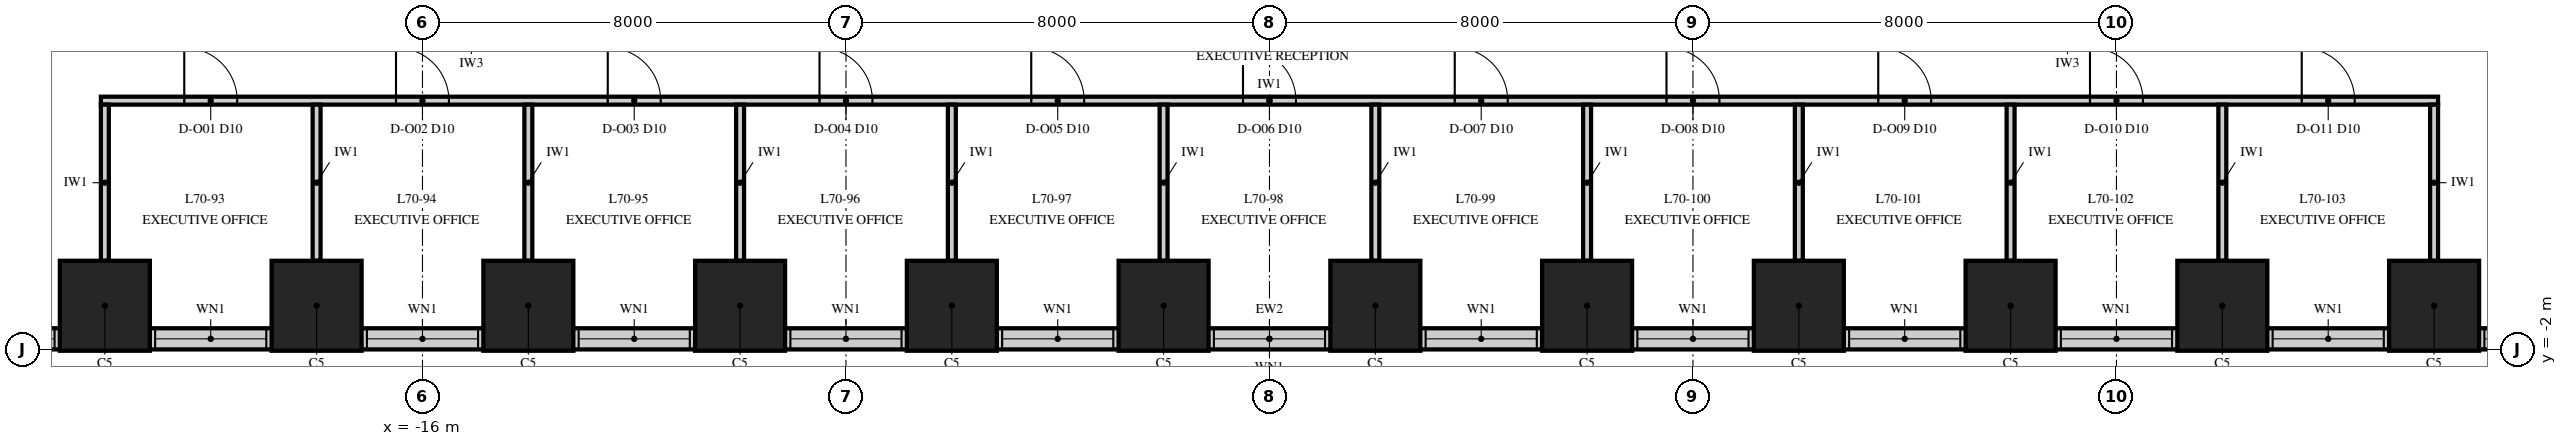
"""IFC4 building model, lengths in metres.
Left out: names, types, materials, properties, quantities, classifications, styles, units other than length and angle.
Written with IfcOpenShell. Run it as: python <this file> out.ifc"""

import sys

from ifc_helpers import new_model, si_unit, direction, frame, frame_2d, origin, origin_2d, place, context, subcontext, project, spatial, rectangle, extrude, element, fill, save


model = new_model("IFC4")
c1 = context("Model", 3, precision=1e-05, world=origin(), true_north=direction((0.0, 1.0)))
c2 = subcontext(c1, "Body", "Model", "MODEL_VIEW")
j1 = project(units=[si_unit("LENGTHUNIT", "METRE"), si_unit("PLANEANGLEUNIT", "RADIAN")], contexts=[c1])
p1 = place(None, origin())
s1 = spatial("IfcSite", under=j1, at=p1, CompositionType="ELEMENT")
p2 = place(p1, origin())
s2 = spatial("IfcBuilding", under=s1, at=p2, CompositionType="ELEMENT")
p3 = place(p2, frame((0.0, 0.0, 300.0)))
s3 = spatial("IfcBuildingStorey", under=s2, at=p3, CompositionType="ELEMENT", Elevation=300.0)
for number, where, z_axis, x_axis in (
    (1, (-22.0, -1.175, 0.0), (0.0, 0.0, 1.0), (1.0, 0.0, 0.0)),
    (2, (-18.0, -1.175, 0.0), (0.0, 0.0, 1.0), (1.0, 0.0, 0.0)),
    (3, (-14.0, -1.175, 0.0), (0.0, 0.0, 1.0), (1.0, 0.0, 0.0)),
    (4, (-10.0, -1.175, 0.0), (0.0, 0.0, 1.0), (1.0, 0.0, 0.0)),
    (5, (-6.0, -1.175, 0.0), (0.0, 0.0, 1.0), (1.0, 0.0, 0.0)),
    (6, (-2.0, -1.175, 0.0), (0.0, 0.0, 1.0), (1.0, 0.0, 0.0)),
    (7, (2.0, -1.175, 0.0), (0.0, 0.0, 1.0), (1.0, 0.0, 0.0)),
    (8, (6.0, -1.175, 0.0), (0.0, 0.0, 1.0), (1.0, 0.0, 0.0)),
    (9, (10.0, -1.175, 0.0), (0.0, 0.0, 1.0), (1.0, 0.0, 0.0)),
    (10, (14.0, -1.175, 0.0), (0.0, 0.0, 1.0), (1.0, 0.0, 0.0)),
    (11, (18.0, -1.175, 0.0), (0.0, 0.0, 1.0), (1.0, 0.0, 0.0)),
    (12, (22.0, -1.175, 0.0), (0.0, 0.0, 1.0), (1.0, 0.0, 0.0)),
):
    element("IfcColumn", number, at=place(p3, frame(where, z_axis=z_axis, x_axis=x_axis)), inside=s3, PredefinedType="COLUMN", context=c2, shape_type="SweptSolid", body=[
        extrude(rectangle(XDim=1.7, YDim=1.7, at=origin_2d()), origin(), (0.0, 0.0, 1.0), 4.0),
    ])
p4 = place(p3, frame((-26.0, -1.8, 0.0), z_axis=(0.0, 0.0, 1.0), x_axis=(1.0, 0.0, 0.0)))
e13 = element("IfcWall", 13, at=p4, inside=s3, PredefinedType="SOLIDWALL", context=c2, shape_type="SweptSolid", body=[
    extrude(rectangle(XDim=52.0, YDim=0.4, at=frame_2d((26.0, 0.0))), origin(), (0.0, 0.0, 1.0), 2.0),
])
p5 = place(p4, frame((0.95, 0.0, 0.8)))
e14 = element("IfcOpeningElement", 14, at=p5, cuts=e13, PredefinedType="OPENING", context=c2, shape_type="SweptSolid", body=[
    extrude(rectangle(XDim=2.1, YDim=1.15, at=frame_2d((1.05, 0.575))), frame((0.0, 0.215, 0.0), z_axis=(0.0, -1.0, 0.0), x_axis=(1.0, 0.0, 0.0)), (0.0, 0.0, 1.0), 0.43),
])
p6 = place(p4, frame((4.95, 0.0, 0.8)))
e15 = element("IfcOpeningElement", 15, at=p6, cuts=e13, PredefinedType="OPENING", context=c2, shape_type="SweptSolid", body=[
    extrude(rectangle(XDim=2.1, YDim=1.15, at=frame_2d((1.05, 0.575))), frame((0.0, 0.215, 0.0), z_axis=(0.0, -1.0, 0.0), x_axis=(1.0, 0.0, 0.0)), (0.0, 0.0, 1.0), 0.43),
])
p7 = place(p4, frame((8.95, 0.0, 0.8)))
e16 = element("IfcOpeningElement", 16, at=p7, cuts=e13, PredefinedType="OPENING", context=c2, shape_type="SweptSolid", body=[
    extrude(rectangle(XDim=2.1, YDim=1.15, at=frame_2d((1.05, 0.575))), frame((0.0, 0.215, 0.0), z_axis=(0.0, -1.0, 0.0), x_axis=(1.0, 0.0, 0.0)), (0.0, 0.0, 1.0), 0.43),
])
p8 = place(p4, frame((12.95, 0.0, 0.8)))
e17 = element("IfcOpeningElement", 17, at=p8, cuts=e13, PredefinedType="OPENING", context=c2, shape_type="SweptSolid", body=[
    extrude(rectangle(XDim=2.1, YDim=1.15, at=frame_2d((1.05, 0.575))), frame((0.0, 0.215, 0.0), z_axis=(0.0, -1.0, 0.0), x_axis=(1.0, 0.0, 0.0)), (0.0, 0.0, 1.0), 0.43),
])
p9 = place(p4, frame((16.95, 0.0, 0.8)))
e18 = element("IfcOpeningElement", 18, at=p9, cuts=e13, PredefinedType="OPENING", context=c2, shape_type="SweptSolid", body=[
    extrude(rectangle(XDim=2.1, YDim=1.15, at=frame_2d((1.05, 0.575))), frame((0.0, 0.215, 0.0), z_axis=(0.0, -1.0, 0.0), x_axis=(1.0, 0.0, 0.0)), (0.0, 0.0, 1.0), 0.43),
])
p10 = place(p4, frame((20.95, 0.0, 0.8)))
e19 = element("IfcOpeningElement", 19, at=p10, cuts=e13, PredefinedType="OPENING", context=c2, shape_type="SweptSolid", body=[
    extrude(rectangle(XDim=2.1, YDim=1.15, at=frame_2d((1.05, 0.575))), frame((0.0, 0.215, 0.0), z_axis=(0.0, -1.0, 0.0), x_axis=(1.0, 0.0, 0.0)), (0.0, 0.0, 1.0), 0.43),
])
p11 = place(p4, frame((24.95, 0.0, 0.8)))
e20 = element("IfcOpeningElement", 20, at=p11, cuts=e13, PredefinedType="OPENING", context=c2, shape_type="SweptSolid", body=[
    extrude(rectangle(XDim=2.1, YDim=1.15, at=frame_2d((1.05, 0.575))), frame((0.0, 0.215, 0.0), z_axis=(0.0, -1.0, 0.0), x_axis=(1.0, 0.0, 0.0)), (0.0, 0.0, 1.0), 0.43),
])
p12 = place(p4, frame((28.95, 0.0, 0.8)))
e21 = element("IfcOpeningElement", 21, at=p12, cuts=e13, PredefinedType="OPENING", context=c2, shape_type="SweptSolid", body=[
    extrude(rectangle(XDim=2.1, YDim=1.15, at=frame_2d((1.05, 0.575))), frame((0.0, 0.215, 0.0), z_axis=(0.0, -1.0, 0.0), x_axis=(1.0, 0.0, 0.0)), (0.0, 0.0, 1.0), 0.43),
])
p13 = place(p4, frame((32.95, 0.0, 0.8)))
e22 = element("IfcOpeningElement", 22, at=p13, cuts=e13, PredefinedType="OPENING", context=c2, shape_type="SweptSolid", body=[
    extrude(rectangle(XDim=2.1, YDim=1.15, at=frame_2d((1.05, 0.575))), frame((0.0, 0.215, 0.0), z_axis=(0.0, -1.0, 0.0), x_axis=(1.0, 0.0, 0.0)), (0.0, 0.0, 1.0), 0.43),
])
p14 = place(p4, frame((36.95, 0.0, 0.8)))
e23 = element("IfcOpeningElement", 23, at=p14, cuts=e13, PredefinedType="OPENING", context=c2, shape_type="SweptSolid", body=[
    extrude(rectangle(XDim=2.1, YDim=1.15, at=frame_2d((1.05, 0.575))), frame((0.0, 0.215, 0.0), z_axis=(0.0, -1.0, 0.0), x_axis=(1.0, 0.0, 0.0)), (0.0, 0.0, 1.0), 0.43),
])
p15 = place(p4, frame((40.95, 0.0, 0.8)))
e24 = element("IfcOpeningElement", 24, at=p15, cuts=e13, PredefinedType="OPENING", context=c2, shape_type="SweptSolid", body=[
    extrude(rectangle(XDim=2.1, YDim=1.15, at=frame_2d((1.05, 0.575))), frame((0.0, 0.215, 0.0), z_axis=(0.0, -1.0, 0.0), x_axis=(1.0, 0.0, 0.0)), (0.0, 0.0, 1.0), 0.43),
])
p16 = place(p4, frame((44.95, 0.0, 0.8)))
e25 = element("IfcOpeningElement", 25, at=p16, cuts=e13, PredefinedType="OPENING", context=c2, shape_type="SweptSolid", body=[
    extrude(rectangle(XDim=2.1, YDim=1.15, at=frame_2d((1.05, 0.575))), frame((0.0, 0.215, 0.0), z_axis=(0.0, -1.0, 0.0), x_axis=(1.0, 0.0, 0.0)), (0.0, 0.0, 1.0), 0.43),
])
p17 = place(p4, frame((48.95, 0.0, 0.8)))
e26 = element("IfcOpeningElement", 26, at=p17, cuts=e13, PredefinedType="OPENING", context=c2, shape_type="SweptSolid", body=[
    extrude(rectangle(XDim=2.1, YDim=1.15, at=frame_2d((1.05, 0.575))), frame((0.0, 0.215, 0.0), z_axis=(0.0, -1.0, 0.0), x_axis=(1.0, 0.0, 0.0)), (0.0, 0.0, 1.0), 0.43),
])
p18 = place(p3, frame((-22.075, 2.7, 0.0), z_axis=(0.0, 0.0, 1.0), x_axis=(1.0, 0.0, 0.0)))
e27 = element("IfcWall", 27, at=p18, inside=s3, PredefinedType="PARTITIONING", context=c2, shape_type="SweptSolid", body=[
    extrude(rectangle(XDim=44.15, YDim=0.15, at=frame_2d((22.075, 0.0))), origin(), (0.0, 0.0, 1.0), 3.23),
])
p19 = place(p18, frame((1.575, 0.0, 0.0)))
e28 = element("IfcOpeningElement", 28, at=p19, cuts=e27, PredefinedType="OPENING", context=c2, shape_type="SweptSolid", body=[
    extrude(rectangle(XDim=1.0, YDim=2.3, at=frame_2d((0.5, 1.15))), frame((0.0, 0.09, 0.0), z_axis=(0.0, -1.0, 0.0), x_axis=(1.0, 0.0, 0.0)), (0.0, 0.0, 1.0), 0.18),
])
p20 = place(p18, frame((5.575, 0.0, 0.0)))
e29 = element("IfcOpeningElement", 29, at=p20, cuts=e27, PredefinedType="OPENING", context=c2, shape_type="SweptSolid", body=[
    extrude(rectangle(XDim=1.0, YDim=2.3, at=frame_2d((0.5, 1.15))), frame((0.0, 0.09, 0.0), z_axis=(0.0, -1.0, 0.0), x_axis=(1.0, 0.0, 0.0)), (0.0, 0.0, 1.0), 0.18),
])
p21 = place(p18, frame((9.575, 0.0, 0.0)))
e30 = element("IfcOpeningElement", 30, at=p21, cuts=e27, PredefinedType="OPENING", context=c2, shape_type="SweptSolid", body=[
    extrude(rectangle(XDim=1.0, YDim=2.3, at=frame_2d((0.5, 1.15))), frame((0.0, 0.09, 0.0), z_axis=(0.0, -1.0, 0.0), x_axis=(1.0, 0.0, 0.0)), (0.0, 0.0, 1.0), 0.18),
])
p22 = place(p18, frame((13.575, 0.0, 0.0)))
e31 = element("IfcOpeningElement", 31, at=p22, cuts=e27, PredefinedType="OPENING", context=c2, shape_type="SweptSolid", body=[
    extrude(rectangle(XDim=1.0, YDim=2.3, at=frame_2d((0.5, 1.15))), frame((0.0, 0.09, 0.0), z_axis=(0.0, -1.0, 0.0), x_axis=(1.0, 0.0, 0.0)), (0.0, 0.0, 1.0), 0.18),
])
p23 = place(p18, frame((17.575, 0.0, 0.0)))
e32 = element("IfcOpeningElement", 32, at=p23, cuts=e27, PredefinedType="OPENING", context=c2, shape_type="SweptSolid", body=[
    extrude(rectangle(XDim=1.0, YDim=2.3, at=frame_2d((0.5, 1.15))), frame((0.0, 0.09, 0.0), z_axis=(0.0, -1.0, 0.0), x_axis=(1.0, 0.0, 0.0)), (0.0, 0.0, 1.0), 0.18),
])
p24 = place(p18, frame((21.575, 0.0, 0.0)))
e33 = element("IfcOpeningElement", 33, at=p24, cuts=e27, PredefinedType="OPENING", context=c2, shape_type="SweptSolid", body=[
    extrude(rectangle(XDim=1.0, YDim=2.3, at=frame_2d((0.5, 1.15))), frame((0.0, 0.09, 0.0), z_axis=(0.0, -1.0, 0.0), x_axis=(1.0, 0.0, 0.0)), (0.0, 0.0, 1.0), 0.18),
])
p25 = place(p18, frame((25.575, 0.0, 0.0)))
e34 = element("IfcOpeningElement", 34, at=p25, cuts=e27, PredefinedType="OPENING", context=c2, shape_type="SweptSolid", body=[
    extrude(rectangle(XDim=1.0, YDim=2.3, at=frame_2d((0.5, 1.15))), frame((0.0, 0.09, 0.0), z_axis=(0.0, -1.0, 0.0), x_axis=(1.0, 0.0, 0.0)), (0.0, 0.0, 1.0), 0.18),
])
p26 = place(p18, frame((29.575, 0.0, 0.0)))
e35 = element("IfcOpeningElement", 35, at=p26, cuts=e27, PredefinedType="OPENING", context=c2, shape_type="SweptSolid", body=[
    extrude(rectangle(XDim=1.0, YDim=2.3, at=frame_2d((0.5, 1.15))), frame((0.0, 0.09, 0.0), z_axis=(0.0, -1.0, 0.0), x_axis=(1.0, 0.0, 0.0)), (0.0, 0.0, 1.0), 0.18),
])
p27 = place(p18, frame((33.575, 0.0, 0.0)))
e36 = element("IfcOpeningElement", 36, at=p27, cuts=e27, PredefinedType="OPENING", context=c2, shape_type="SweptSolid", body=[
    extrude(rectangle(XDim=1.0, YDim=2.3, at=frame_2d((0.5, 1.15))), frame((0.0, 0.09, 0.0), z_axis=(0.0, -1.0, 0.0), x_axis=(1.0, 0.0, 0.0)), (0.0, 0.0, 1.0), 0.18),
])
p28 = place(p18, frame((37.575, 0.0, 0.0)))
e37 = element("IfcOpeningElement", 37, at=p28, cuts=e27, PredefinedType="OPENING", context=c2, shape_type="SweptSolid", body=[
    extrude(rectangle(XDim=1.0, YDim=2.3, at=frame_2d((0.5, 1.15))), frame((0.0, 0.09, 0.0), z_axis=(0.0, -1.0, 0.0), x_axis=(1.0, 0.0, 0.0)), (0.0, 0.0, 1.0), 0.18),
])
p29 = place(p18, frame((41.575, 0.0, 0.0)))
e38 = element("IfcOpeningElement", 38, at=p29, cuts=e27, PredefinedType="OPENING", context=c2, shape_type="SweptSolid", body=[
    extrude(rectangle(XDim=1.0, YDim=2.3, at=frame_2d((0.5, 1.15))), frame((0.0, 0.09, 0.0), z_axis=(0.0, -1.0, 0.0), x_axis=(1.0, 0.0, 0.0)), (0.0, 0.0, 1.0), 0.18),
])
for number, where, z_axis, x_axis in (
    (39, (-22.0, -0.325, 0.0), (0.0, 0.0, 1.0), (0.0, 1.0, 0.0)),
    (40, (-18.0, -0.325, 0.0), (0.0, 0.0, 1.0), (0.0, 1.0, 0.0)),
    (41, (-14.0, -0.325, 0.0), (0.0, 0.0, 1.0), (0.0, 1.0, 0.0)),
    (42, (-10.0, -0.325, 0.0), (0.0, 0.0, 1.0), (0.0, 1.0, 0.0)),
    (43, (-6.0, -0.325, 0.0), (0.0, 0.0, 1.0), (0.0, 1.0, 0.0)),
    (44, (-2.0, -0.325, 0.0), (0.0, 0.0, 1.0), (0.0, 1.0, 0.0)),
    (45, (2.0, -0.325, 0.0), (0.0, 0.0, 1.0), (0.0, 1.0, 0.0)),
    (46, (6.0, -0.325, 0.0), (0.0, 0.0, 1.0), (0.0, 1.0, 0.0)),
    (47, (10.0, -0.325, 0.0), (0.0, 0.0, 1.0), (0.0, 1.0, 0.0)),
    (48, (14.0, -0.325, 0.0), (0.0, 0.0, 1.0), (0.0, 1.0, 0.0)),
    (49, (18.0, -0.325, 0.0), (0.0, 0.0, 1.0), (0.0, 1.0, 0.0)),
    (50, (22.0, -0.325, 0.0), (0.0, 0.0, 1.0), (0.0, 1.0, 0.0)),
):
    element("IfcWall", number, at=place(p3, frame(where, z_axis=z_axis, x_axis=x_axis)), inside=s3, PredefinedType="PARTITIONING", context=c2, shape_type="SweptSolid", body=[
        extrude(rectangle(XDim=2.95, YDim=0.15, at=frame_2d((1.475, 0.0))), origin(), (0.0, 0.0, 1.0), 3.23),
    ])
p30 = place(p5, origin())
e51 = element("IfcWindow", 51, at=p30, inside=s3, PartitioningType="SINGLE_PANEL", PredefinedType="WINDOW", context=c2, shape_type="SweptSolid", body=[
    extrude(rectangle(XDim=2.1, YDim=1.15, at=frame_2d((1.05, 0.575))), frame((0.0, 0.03, 0.0), z_axis=(0.0, -1.0, 0.0), x_axis=(1.0, 0.0, 0.0)), (0.0, 0.0, 1.0), 0.06),
])
fill(e14, e51)
p31 = place(p6, origin())
e52 = element("IfcWindow", 52, at=p31, inside=s3, PartitioningType="SINGLE_PANEL", PredefinedType="WINDOW", context=c2, shape_type="SweptSolid", body=[
    extrude(rectangle(XDim=2.1, YDim=1.15, at=frame_2d((1.05, 0.575))), frame((0.0, 0.03, 0.0), z_axis=(0.0, -1.0, 0.0), x_axis=(1.0, 0.0, 0.0)), (0.0, 0.0, 1.0), 0.06),
])
fill(e15, e52)
p32 = place(p7, origin())
e53 = element("IfcWindow", 53, at=p32, inside=s3, PartitioningType="SINGLE_PANEL", PredefinedType="WINDOW", context=c2, shape_type="SweptSolid", body=[
    extrude(rectangle(XDim=2.1, YDim=1.15, at=frame_2d((1.05, 0.575))), frame((0.0, 0.03, 0.0), z_axis=(0.0, -1.0, 0.0), x_axis=(1.0, 0.0, 0.0)), (0.0, 0.0, 1.0), 0.06),
])
fill(e16, e53)
p33 = place(p8, origin())
e54 = element("IfcWindow", 54, at=p33, inside=s3, PartitioningType="SINGLE_PANEL", PredefinedType="WINDOW", context=c2, shape_type="SweptSolid", body=[
    extrude(rectangle(XDim=2.1, YDim=1.15, at=frame_2d((1.05, 0.575))), frame((0.0, 0.03, 0.0), z_axis=(0.0, -1.0, 0.0), x_axis=(1.0, 0.0, 0.0)), (0.0, 0.0, 1.0), 0.06),
])
fill(e17, e54)
p34 = place(p9, origin())
e55 = element("IfcWindow", 55, at=p34, inside=s3, PartitioningType="SINGLE_PANEL", PredefinedType="WINDOW", context=c2, shape_type="SweptSolid", body=[
    extrude(rectangle(XDim=2.1, YDim=1.15, at=frame_2d((1.05, 0.575))), frame((0.0, 0.03, 0.0), z_axis=(0.0, -1.0, 0.0), x_axis=(1.0, 0.0, 0.0)), (0.0, 0.0, 1.0), 0.06),
])
fill(e18, e55)
p35 = place(p10, origin())
e56 = element("IfcWindow", 56, at=p35, inside=s3, PartitioningType="SINGLE_PANEL", PredefinedType="WINDOW", context=c2, shape_type="SweptSolid", body=[
    extrude(rectangle(XDim=2.1, YDim=1.15, at=frame_2d((1.05, 0.575))), frame((0.0, 0.03, 0.0), z_axis=(0.0, -1.0, 0.0), x_axis=(1.0, 0.0, 0.0)), (0.0, 0.0, 1.0), 0.06),
])
fill(e19, e56)
p36 = place(p11, origin())
e57 = element("IfcWindow", 57, at=p36, inside=s3, PartitioningType="SINGLE_PANEL", PredefinedType="WINDOW", context=c2, shape_type="SweptSolid", body=[
    extrude(rectangle(XDim=2.1, YDim=1.15, at=frame_2d((1.05, 0.575))), frame((0.0, 0.03, 0.0), z_axis=(0.0, -1.0, 0.0), x_axis=(1.0, 0.0, 0.0)), (0.0, 0.0, 1.0), 0.06),
])
fill(e20, e57)
p37 = place(p12, origin())
e58 = element("IfcWindow", 58, at=p37, inside=s3, PartitioningType="SINGLE_PANEL", PredefinedType="WINDOW", context=c2, shape_type="SweptSolid", body=[
    extrude(rectangle(XDim=2.1, YDim=1.15, at=frame_2d((1.05, 0.575))), frame((0.0, 0.03, 0.0), z_axis=(0.0, -1.0, 0.0), x_axis=(1.0, 0.0, 0.0)), (0.0, 0.0, 1.0), 0.06),
])
fill(e21, e58)
p38 = place(p13, origin())
e59 = element("IfcWindow", 59, at=p38, inside=s3, PartitioningType="SINGLE_PANEL", PredefinedType="WINDOW", context=c2, shape_type="SweptSolid", body=[
    extrude(rectangle(XDim=2.1, YDim=1.15, at=frame_2d((1.05, 0.575))), frame((0.0, 0.03, 0.0), z_axis=(0.0, -1.0, 0.0), x_axis=(1.0, 0.0, 0.0)), (0.0, 0.0, 1.0), 0.06),
])
fill(e22, e59)
p39 = place(p14, origin())
e60 = element("IfcWindow", 60, at=p39, inside=s3, PartitioningType="SINGLE_PANEL", PredefinedType="WINDOW", context=c2, shape_type="SweptSolid", body=[
    extrude(rectangle(XDim=2.1, YDim=1.15, at=frame_2d((1.05, 0.575))), frame((0.0, 0.03, 0.0), z_axis=(0.0, -1.0, 0.0), x_axis=(1.0, 0.0, 0.0)), (0.0, 0.0, 1.0), 0.06),
])
fill(e23, e60)
p40 = place(p15, origin())
e61 = element("IfcWindow", 61, at=p40, inside=s3, PartitioningType="SINGLE_PANEL", PredefinedType="WINDOW", context=c2, shape_type="SweptSolid", body=[
    extrude(rectangle(XDim=2.1, YDim=1.15, at=frame_2d((1.05, 0.575))), frame((0.0, 0.03, 0.0), z_axis=(0.0, -1.0, 0.0), x_axis=(1.0, 0.0, 0.0)), (0.0, 0.0, 1.0), 0.06),
])
fill(e24, e61)
p41 = place(p16, origin())
e62 = element("IfcWindow", 62, at=p41, inside=s3, PartitioningType="SINGLE_PANEL", PredefinedType="WINDOW", context=c2, shape_type="SweptSolid", body=[
    extrude(rectangle(XDim=2.1, YDim=1.15, at=frame_2d((1.05, 0.575))), frame((0.0, 0.03, 0.0), z_axis=(0.0, -1.0, 0.0), x_axis=(1.0, 0.0, 0.0)), (0.0, 0.0, 1.0), 0.06),
])
fill(e25, e62)
p42 = place(p17, origin())
e63 = element("IfcWindow", 63, at=p42, inside=s3, PartitioningType="SINGLE_PANEL", PredefinedType="WINDOW", context=c2, shape_type="SweptSolid", body=[
    extrude(rectangle(XDim=2.1, YDim=1.15, at=frame_2d((1.05, 0.575))), frame((0.0, 0.03, 0.0), z_axis=(0.0, -1.0, 0.0), x_axis=(1.0, 0.0, 0.0)), (0.0, 0.0, 1.0), 0.06),
])
fill(e26, e63)
p43 = place(p19, origin())
e64 = element("IfcDoor", 64, at=p43, inside=s3, OperationType="SINGLE_SWING_LEFT", PredefinedType="DOOR", context=c2, shape_type="SweptSolid", body=[
    extrude(rectangle(XDim=1.0, YDim=2.3, at=frame_2d((0.5, 1.15))), frame((0.0, 0.075, 0.0), z_axis=(0.0, -1.0, 0.0), x_axis=(1.0, 0.0, 0.0)), (0.0, 0.0, 1.0), 0.149),
])
fill(e28, e64)
p44 = place(p20, origin())
e65 = element("IfcDoor", 65, at=p44, inside=s3, OperationType="SINGLE_SWING_LEFT", PredefinedType="DOOR", context=c2, shape_type="SweptSolid", body=[
    extrude(rectangle(XDim=1.0, YDim=2.3, at=frame_2d((0.5, 1.15))), frame((0.0, 0.075, 0.0), z_axis=(0.0, -1.0, 0.0), x_axis=(1.0, 0.0, 0.0)), (0.0, 0.0, 1.0), 0.149),
])
fill(e29, e65)
p45 = place(p21, origin())
e66 = element("IfcDoor", 66, at=p45, inside=s3, OperationType="SINGLE_SWING_LEFT", PredefinedType="DOOR", context=c2, shape_type="SweptSolid", body=[
    extrude(rectangle(XDim=1.0, YDim=2.3, at=frame_2d((0.5, 1.15))), frame((0.0, 0.075, 0.0), z_axis=(0.0, -1.0, 0.0), x_axis=(1.0, 0.0, 0.0)), (0.0, 0.0, 1.0), 0.149),
])
fill(e30, e66)
p46 = place(p22, origin())
e67 = element("IfcDoor", 67, at=p46, inside=s3, OperationType="SINGLE_SWING_LEFT", PredefinedType="DOOR", context=c2, shape_type="SweptSolid", body=[
    extrude(rectangle(XDim=1.0, YDim=2.3, at=frame_2d((0.5, 1.15))), frame((0.0, 0.075, 0.0), z_axis=(0.0, -1.0, 0.0), x_axis=(1.0, 0.0, 0.0)), (0.0, 0.0, 1.0), 0.149),
])
fill(e31, e67)
p47 = place(p23, origin())
e68 = element("IfcDoor", 68, at=p47, inside=s3, OperationType="SINGLE_SWING_LEFT", PredefinedType="DOOR", context=c2, shape_type="SweptSolid", body=[
    extrude(rectangle(XDim=1.0, YDim=2.3, at=frame_2d((0.5, 1.15))), frame((0.0, 0.075, 0.0), z_axis=(0.0, -1.0, 0.0), x_axis=(1.0, 0.0, 0.0)), (0.0, 0.0, 1.0), 0.149),
])
fill(e32, e68)
p48 = place(p24, origin())
e69 = element("IfcDoor", 69, at=p48, inside=s3, OperationType="SINGLE_SWING_LEFT", PredefinedType="DOOR", context=c2, shape_type="SweptSolid", body=[
    extrude(rectangle(XDim=1.0, YDim=2.3, at=frame_2d((0.5, 1.15))), frame((0.0, 0.075, 0.0), z_axis=(0.0, -1.0, 0.0), x_axis=(1.0, 0.0, 0.0)), (0.0, 0.0, 1.0), 0.149),
])
fill(e33, e69)
p49 = place(p25, origin())
e70 = element("IfcDoor", 70, at=p49, inside=s3, OperationType="SINGLE_SWING_LEFT", PredefinedType="DOOR", context=c2, shape_type="SweptSolid", body=[
    extrude(rectangle(XDim=1.0, YDim=2.3, at=frame_2d((0.5, 1.15))), frame((0.0, 0.075, 0.0), z_axis=(0.0, -1.0, 0.0), x_axis=(1.0, 0.0, 0.0)), (0.0, 0.0, 1.0), 0.149),
])
fill(e34, e70)
p50 = place(p26, origin())
e71 = element("IfcDoor", 71, at=p50, inside=s3, OperationType="SINGLE_SWING_LEFT", PredefinedType="DOOR", context=c2, shape_type="SweptSolid", body=[
    extrude(rectangle(XDim=1.0, YDim=2.3, at=frame_2d((0.5, 1.15))), frame((0.0, 0.075, 0.0), z_axis=(0.0, -1.0, 0.0), x_axis=(1.0, 0.0, 0.0)), (0.0, 0.0, 1.0), 0.149),
])
fill(e35, e71)
p51 = place(p27, origin())
e72 = element("IfcDoor", 72, at=p51, inside=s3, OperationType="SINGLE_SWING_LEFT", PredefinedType="DOOR", context=c2, shape_type="SweptSolid", body=[
    extrude(rectangle(XDim=1.0, YDim=2.3, at=frame_2d((0.5, 1.15))), frame((0.0, 0.075, 0.0), z_axis=(0.0, -1.0, 0.0), x_axis=(1.0, 0.0, 0.0)), (0.0, 0.0, 1.0), 0.149),
])
fill(e36, e72)
p52 = place(p28, origin())
e73 = element("IfcDoor", 73, at=p52, inside=s3, OperationType="SINGLE_SWING_LEFT", PredefinedType="DOOR", context=c2, shape_type="SweptSolid", body=[
    extrude(rectangle(XDim=1.0, YDim=2.3, at=frame_2d((0.5, 1.15))), frame((0.0, 0.075, 0.0), z_axis=(0.0, -1.0, 0.0), x_axis=(1.0, 0.0, 0.0)), (0.0, 0.0, 1.0), 0.149),
])
fill(e37, e73)
p53 = place(p29, origin())
e74 = element("IfcDoor", 74, at=p53, inside=s3, OperationType="SINGLE_SWING_LEFT", PredefinedType="DOOR", context=c2, shape_type="SweptSolid", body=[
    extrude(rectangle(XDim=1.0, YDim=2.3, at=frame_2d((0.5, 1.15))), frame((0.0, 0.075, 0.0), z_axis=(0.0, -1.0, 0.0), x_axis=(1.0, 0.0, 0.0)), (0.0, 0.0, 1.0), 0.149),
])
fill(e38, e74)
save(model, sys.argv[1])
